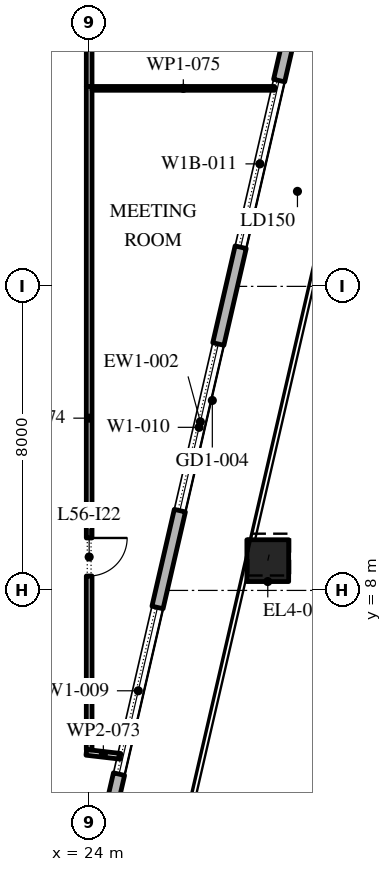
"""IFC4 building model, lengths in metres.
Left out: names, types, materials, properties, quantities, classifications, styles, units other than length and angle.
Written with IfcOpenShell. Run it as: python <this file> out.ifc"""

import sys

from ifc_helpers import new_model, si_unit, direction, frame, frame_2d, origin, origin_2d, place, context, subcontext, project, spatial, rectangle, extrude, element, fill, save


model = new_model("IFC4")
c1 = context("Model", 3, precision=1e-05, world=origin(), true_north=direction((0.0, 1.0)))
c2 = subcontext(c1, "Body", "Model", "MODEL_VIEW")
j1 = project(units=[si_unit("LENGTHUNIT", "METRE"), si_unit("PLANEANGLEUNIT", "RADIAN")], contexts=[c1])
p1 = place(None, origin())
s1 = spatial("IfcSite", under=j1, at=p1, CompositionType="ELEMENT")
p2 = place(p1, origin())
s2 = spatial("IfcBuilding", under=s1, at=p2, CompositionType="ELEMENT")
p3 = place(p2, frame((0.0, 0.0, 259.8)))
s3 = spatial("IfcBuildingStorey", under=s2, at=p3, CompositionType="ELEMENT", Elevation=259.8)
p4 = place(p3, frame((28.7, 8.783, 0.0), z_axis=(0.008770884695, 0.037929719907, 0.99924191662), x_axis=(-0.974290512438, 0.225295355862, 0.0)))
e1 = element("IfcColumn", 1, at=p4, inside=s3, PredefinedType="COLUMN", context=c2, shape_type="SweptSolid", body=[
    extrude(rectangle(XDim=1.1, YDim=1.1, at=origin_2d()), origin(), (0.0, 0.0, 1.0), 4.203),
])
p5 = place(p3, frame((30.521, 16.672, 0.0), z_axis=(0.011668267153, 0.050562490995, 0.998652735462), x_axis=(-0.974391195695, 0.224859506699, 0.0)))
e2 = element("IfcColumn", 2, at=p5, inside=s3, PredefinedType="COLUMN", context=c2, shape_type="SweptSolid", body=[
    extrude(rectangle(XDim=1.1, YDim=1.1, at=origin_2d()), origin(), (0.0, 0.0, 1.0), 4.206),
])
p6 = place(p3, frame((21.359, -11.678, 0.0), z_axis=(0.0, 0.0, 1.0), x_axis=(0.224949198343, 0.974370493275, 0.0)))
e3 = element("IfcWall", 3, at=p6, inside=s3, PredefinedType="STANDARD", context=c2, shape_type="SweptSolid", body=[
    extrude(rectangle(XDim=49.5, YDim=0.3, at=frame_2d((24.75, 0.0))), origin(), (0.0, 0.0, 1.0), 4.0),
])
p7 = place(p6, frame((1.157, 0.0, 0.45)))
e4 = element("IfcOpeningElement", 4, at=p7, cuts=e3, PredefinedType="OPENING", context=c2, shape_type="SweptSolid", body=[
    extrude(rectangle(XDim=4.5, YDim=3.05, at=frame_2d((2.25, 1.525))), frame((0.0, 0.16, 0.0), z_axis=(0.0, -1.0, 0.0), x_axis=(1.0, 0.0, 0.0)), (0.0, 0.0, 1.0), 0.32),
])
p8 = place(p6, frame((8.121, 0.0, 0.45)))
e5 = element("IfcOpeningElement", 5, at=p8, cuts=e3, PredefinedType="OPENING", context=c2, shape_type="SweptSolid", body=[
    extrude(rectangle(XDim=4.5, YDim=3.05, at=frame_2d((2.25, 1.525))), frame((0.0, 0.16, 0.0), z_axis=(0.0, -1.0, 0.0), x_axis=(1.0, 0.0, 0.0)), (0.0, 0.0, 1.0), 0.32),
])
p9 = place(p6, frame((15.236, 0.0, 0.45)))
e6 = element("IfcOpeningElement", 6, at=p9, cuts=e3, PredefinedType="OPENING", context=c2, shape_type="SweptSolid", body=[
    extrude(rectangle(XDim=4.5, YDim=3.05, at=frame_2d((2.25, 1.525))), frame((0.0, 0.16, 0.0), z_axis=(0.0, -1.0, 0.0), x_axis=(1.0, 0.0, 0.0)), (0.0, 0.0, 1.0), 0.32),
])
p10 = place(p6, frame((22.35, 0.0, 0.45)))
e7 = element("IfcOpeningElement", 7, at=p10, cuts=e3, PredefinedType="OPENING", context=c2, shape_type="SweptSolid", body=[
    extrude(rectangle(XDim=4.5, YDim=3.05, at=frame_2d((2.25, 1.525))), frame((0.0, 0.16, 0.0), z_axis=(0.0, -1.0, 0.0), x_axis=(1.0, 0.0, 0.0)), (0.0, 0.0, 1.0), 0.32),
])
p11 = place(p6, frame((29.464, 0.0, 0.45)))
e8 = element("IfcOpeningElement", 8, at=p11, cuts=e3, PredefinedType="OPENING", context=c2, shape_type="SweptSolid", body=[
    extrude(rectangle(XDim=4.5, YDim=2.95, at=frame_2d((2.25, 1.475))), frame((0.0, 0.16, 0.0), z_axis=(0.0, -1.0, 0.0), x_axis=(1.0, 0.0, 0.0)), (0.0, 0.0, 1.0), 0.32),
])
p12 = place(p6, frame((37.628, 0.0, 0.0)))
e9 = element("IfcOpeningElement", 9, at=p12, cuts=e3, PredefinedType="OPENING", context=c2, shape_type="SweptSolid", body=[
    extrude(rectangle(XDim=2.4, YDim=3.325, at=frame_2d((1.2, 1.663))), frame((0.0, 0.16, 0.0), z_axis=(0.0, -1.0, 0.0), x_axis=(1.0, 0.0, 0.0)), (0.0, 0.0, 1.0), 0.32),
])
p13 = place(p6, frame((43.693, 0.0, 0.45)))
e10 = element("IfcOpeningElement", 10, at=p13, cuts=e3, PredefinedType="OPENING", context=c2, shape_type="SweptSolid", body=[
    extrude(rectangle(XDim=4.5, YDim=3.05, at=frame_2d((2.25, 1.525))), frame((0.0, 0.16, 0.0), z_axis=(0.0, -1.0, 0.0), x_axis=(1.0, 0.0, 0.0)), (0.0, 0.0, 1.0), 0.32),
])
p14 = place(p3, frame((23.925, 3.739, 0.0), z_axis=(0.0, 0.0, 1.0), x_axis=(0.993344839434, -0.115178253021, 0.0)))
e11 = element("IfcWall", 11, at=p14, inside=s3, PredefinedType="PARTITIONING", context=c2, shape_type="SweptSolid", body=[
    extrude(rectangle(XDim=0.903, YDim=0.15, at=frame_2d((0.452, 0.0))), origin(), (0.0, 0.0, 1.0), 4.0),
])
p15 = place(p3, frame((24.0, 21.26, 0.0), z_axis=(0.0, 0.0, 1.0), x_axis=(0.0, -1.0, 0.0)))
e12 = element("IfcWall", 12, at=p15, inside=s3, PredefinedType="PARTITIONING", context=c2, shape_type="SweptSolid", body=[
    extrude(rectangle(XDim=17.455, YDim=0.15, at=frame_2d((8.728, 0.0))), origin(), (0.0, 0.0, 1.0), 4.0),
])
p16 = place(p15, frame((11.88, 0.0, 0.0)))
e13 = element("IfcOpeningElement", 13, at=p16, cuts=e12, PredefinedType="OPENING", context=c2, shape_type="SweptSolid", body=[
    extrude(rectangle(XDim=1.0, YDim=2.1, at=frame_2d((0.5, 1.05))), frame((0.0, 0.085, 0.0), z_axis=(0.0, -1.0, 0.0), x_axis=(1.0, 0.0, 0.0)), (0.0, 0.0, 1.0), 0.17),
])
p17 = place(p3, frame((24.075, 21.21, 0.0), z_axis=(0.0, 0.0, 1.0), x_axis=(1.0, 0.0, 0.0)))
e14 = element("IfcWall", 14, at=p17, inside=s3, PredefinedType="PARTITIONING", context=c2, shape_type="SweptSolid", body=[
    extrude(rectangle(XDim=4.805, YDim=0.1, at=frame_2d((2.402, 0.0))), origin(), (0.0, 0.0, 1.0), 4.0),
])
p18 = place(p3, frame((24.0, 29.71, 0.0), z_axis=(0.0, 0.0, 1.0), x_axis=(0.0, -1.0, 0.0)))
e15 = element("IfcWall", 15, at=p18, inside=s3, PredefinedType="PARTITIONING", context=c2, shape_type="SweptSolid", body=[
    extrude(rectangle(XDim=8.45, YDim=0.15, at=frame_2d((4.225, 0.0))), origin(), (0.0, 0.0, 1.0), 4.0),
])
p19 = place(p18, frame((2.85, 0.0, 0.0)))
e16 = element("IfcOpeningElement", 16, at=p19, cuts=e15, PredefinedType="OPENING", context=c2, shape_type="SweptSolid", body=[
    extrude(rectangle(XDim=1.0, YDim=2.1, at=frame_2d((0.5, 1.05))), frame((0.0, 0.085, 0.0), z_axis=(0.0, -1.0, 0.0), x_axis=(1.0, 0.0, 0.0)), (0.0, 0.0, 1.0), 0.17),
])
p20 = place(p9, origin())
e17 = element("IfcWindow", 17, at=p20, inside=s3, PartitioningType="DOUBLE_PANEL_VERTICAL", PredefinedType="WINDOW", context=c2, shape_type="SweptSolid", body=[
    extrude(rectangle(XDim=4.5, YDim=3.05, at=frame_2d((2.25, 1.525))), frame((0.0, 0.03, 0.0), z_axis=(0.0, -1.0, 0.0), x_axis=(1.0, 0.0, 0.0)), (0.0, 0.0, 1.0), 0.06),
])
fill(e6, e17)
p21 = place(p10, origin())
e18 = element("IfcWindow", 18, at=p21, inside=s3, PartitioningType="DOUBLE_PANEL_VERTICAL", PredefinedType="WINDOW", context=c2, shape_type="SweptSolid", body=[
    extrude(rectangle(XDim=4.5, YDim=3.05, at=frame_2d((2.25, 1.525))), frame((0.0, 0.03, 0.0), z_axis=(0.0, -1.0, 0.0), x_axis=(1.0, 0.0, 0.0)), (0.0, 0.0, 1.0), 0.06),
])
fill(e7, e18)
p22 = place(p11, origin())
e19 = element("IfcWindow", 19, at=p22, inside=s3, PartitioningType="DOUBLE_PANEL_VERTICAL", PredefinedType="WINDOW", context=c2, shape_type="SweptSolid", body=[
    extrude(rectangle(XDim=4.5, YDim=2.95, at=frame_2d((2.25, 1.475))), frame((0.0, 0.03, 0.0), z_axis=(0.0, -1.0, 0.0), x_axis=(1.0, 0.0, 0.0)), (0.0, 0.0, 1.0), 0.06),
])
fill(e8, e19)
p23 = place(p16, origin())
e20 = element("IfcDoor", 20, at=p23, inside=s3, OperationType="SINGLE_SWING_RIGHT", PredefinedType="DOOR", context=c2, shape_type="SweptSolid", body=[
    extrude(rectangle(XDim=1.0, YDim=2.1, at=frame_2d((0.5, 1.05))), frame((0.0, 0.025, 0.0), z_axis=(0.0, -1.0, 0.0), x_axis=(1.0, 0.0, 0.0)), (0.0, 0.0, 1.0), 0.05),
])
fill(e13, e20)
save(model, sys.argv[1])
